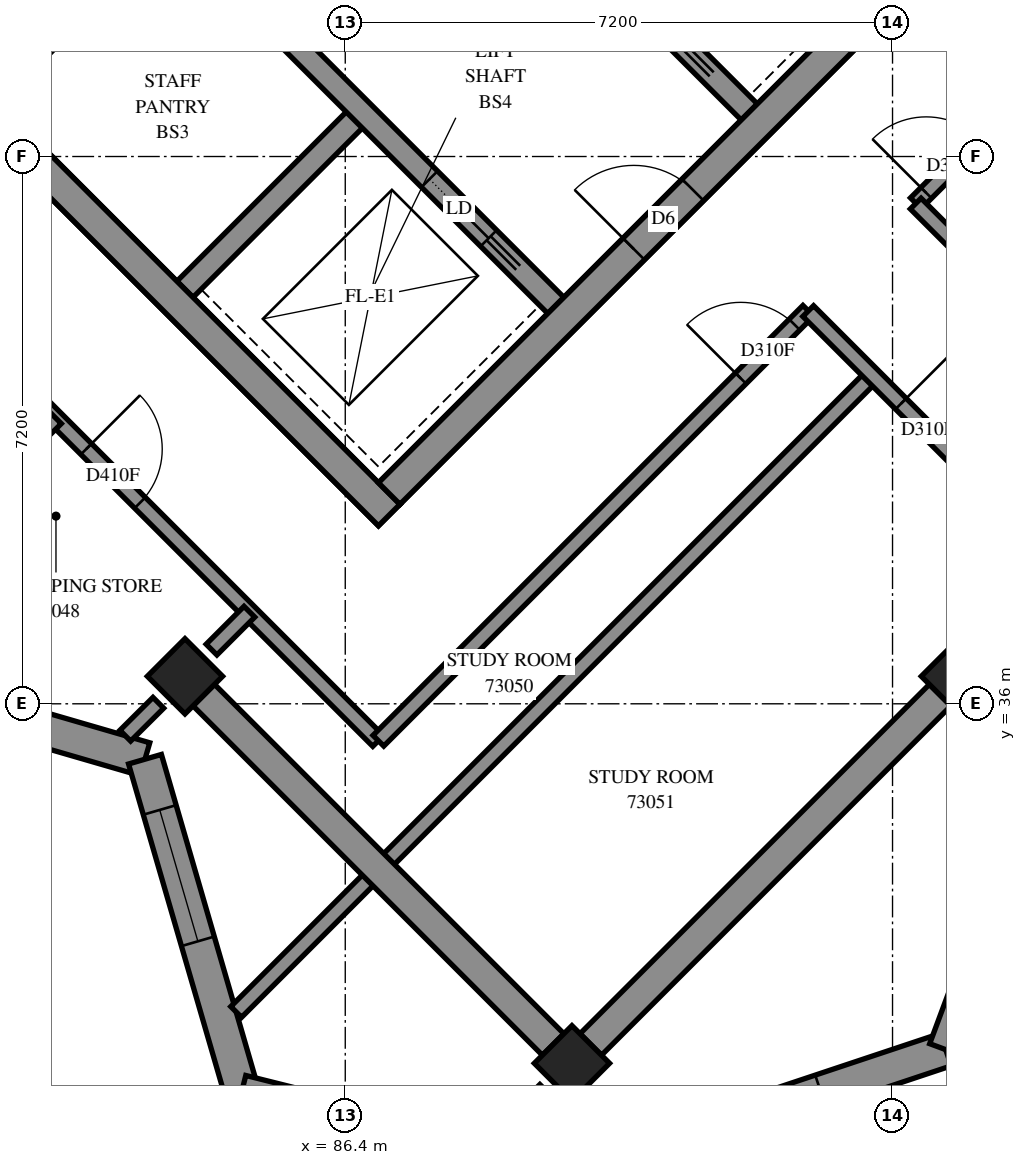
"""IFC4 building model, lengths in metres.
Left out: names, types, materials, properties, quantities, classifications, styles, units other than length and angle.
Written with IfcOpenShell. Run it as: python <this file> out.ifc"""

import sys

from ifc_helpers import new_model, si_unit, direction, frame, frame_2d, origin, origin_2d, place, context, subcontext, project, spatial, polyline, rectangle, outline, extrude, element, fill, save


model = new_model("IFC4")
c1 = context("Model", 3, precision=1e-05, world=origin(), true_north=direction((0.0, 1.0)))
c2 = subcontext(c1, "Body", "Model", "MODEL_VIEW")
j1 = project(units=[si_unit("LENGTHUNIT", "METRE"), si_unit("PLANEANGLEUNIT", "RADIAN")], contexts=[c1])
p1 = place(None, origin())
s1 = spatial("IfcSite", under=j1, at=p1, CompositionType="ELEMENT")
p2 = place(p1, origin())
s2 = spatial("IfcBuilding", under=s1, at=p2, CompositionType="ELEMENT")
p3 = place(p2, frame((0.0, 0.0, 267.6)))
s3 = spatial("IfcBuildingStorey", under=s2, at=p3, CompositionType="ELEMENT", Elevation=267.6)
for number, where, z_axis, x_axis in (
    (1, (84.291, 36.362, 0.0), (0.0, 0.0, 1.0), (0.707, -0.707, 0.0)),
    (2, (94.474, 36.362, 0.0), (0.0, 0.0, 1.0), (0.707, -0.707, 0.0)),
    (3, (89.382, 31.271, 0.0), (0.0, 0.0, 1.0), (0.707, -0.707, 0.0)),
):
    element("IfcColumn", number, at=place(p3, frame(where, z_axis=z_axis, x_axis=x_axis)), inside=s3, PredefinedType="COLUMN", context=c2, shape_type="SweptSolid", body=[
        extrude(rectangle(XDim=0.7, YDim=0.7, at=origin_2d()), origin(), (0.0, 0.0, 1.0), 3.1),
    ])
p4 = place(p3, frame((76.23, 49.231, -0.3), z_axis=(0.0, 0.0, 1.0), x_axis=(0.7071034917, -0.7071100706, 0.0)))
e4 = element("IfcWall", 4, at=p4, inside=s3, PredefinedType="SHEAR", context=c2, shape_type="SweptSolid", body=[
    extrude(rectangle(XDim=15.2, YDim=0.4, at=frame_2d((7.6, 0.0))), origin(), (0.0, 0.0, 1.0), 2.7),
])
p5 = place(p3, frame((86.978, 38.766, -0.3), z_axis=(0.0, 0.0, 1.0), x_axis=(0.7071067812, 0.7071067812, 0.0)))
e5 = element("IfcWall", 5, at=p5, inside=s3, PredefinedType="SHEAR", context=c2, shape_type="SweptSolid", body=[
    extrude(rectangle(XDim=14.4, YDim=0.4, at=frame_2d((7.2, 0.0))), origin(), (0.0, 0.0, 1.0), 2.7),
])
p6 = place(p5, frame((4.55, 0.0, 0.3)))
e6 = element("IfcOpeningElement", 6, at=p6, cuts=e5, PredefinedType="OPENING", context=c2, shape_type="SweptSolid", body=[
    extrude(rectangle(XDim=1.1, YDim=2.1, at=frame_2d((0.55, 1.05))), frame((0.0, 0.21, 0.0), z_axis=(0.0, -1.0, 0.0), x_axis=(1.0, 0.0, 0.0)), (0.0, 0.0, 1.0), 0.42),
])
p7 = place(p5, frame((11.35, 0.0, 0.3)))
e7 = element("IfcOpeningElement", 7, at=p7, cuts=e5, PredefinedType="OPENING", context=c2, shape_type="SweptSolid", body=[
    extrude(rectangle(XDim=1.1, YDim=2.1, at=frame_2d((0.55, 1.05))), frame((0.0, 0.21, 0.0), z_axis=(0.0, -1.0, 0.0), x_axis=(1.0, 0.0, 0.0)), (0.0, 0.0, 1.0), 0.42),
])
for number, where, z_axis, x_axis in (
    (8, (81.746, 43.999, 0.0), (0.0, 0.0, 1.0), (0.707, 0.707, 0.0)),
    (9, (84.291, 41.453, 0.0), (0.0, 0.0, 1.0), (0.707, 0.707, 0.0)),
):
    element("IfcWall", number, at=place(p3, frame(where, z_axis=z_axis, x_axis=x_axis)), inside=s3, PredefinedType="SOLIDWALL", context=c2, shape_type="SweptSolid", body=[
        extrude(rectangle(XDim=3.3, YDim=0.3, at=frame_2d((1.65, 0.0))), origin(), (0.0, 0.0, 1.0), 3.1),
    ])
p8 = place(p3, frame((78.988, 51.423, 0.0), z_axis=(0.0, 0.0, 1.0), x_axis=(0.7071067812, -0.7071067812, 0.0)))
e10 = element("IfcWall", 10, at=p8, inside=s3, PredefinedType="SOLIDWALL", context=c2, shape_type="SweptSolid", body=[
    extrude(rectangle(XDim=14.4, YDim=0.3, at=frame_2d((7.2, 0.0))), origin(), (0.0, 0.0, 1.0), 3.1),
])
p9 = place(p8, frame((4.95, 0.0, 0.0)))
e11 = element("IfcOpeningElement", 11, at=p9, cuts=e10, PredefinedType="OPENING", context=c2, shape_type="SweptSolid", body=[
    extrude(rectangle(XDim=0.9, YDim=2.1, at=frame_2d((0.45, 1.05))), frame((0.0, 0.16, 0.0), z_axis=(0.0, -1.0, 0.0), x_axis=(1.0, 0.0, 0.0)), (0.0, 0.0, 1.0), 0.32),
])
p10 = place(p8, frame((8.55, 0.0, 0.0)))
e12 = element("IfcOpeningElement", 12, at=p10, cuts=e10, PredefinedType="OPENING", context=c2, shape_type="SweptSolid", body=[
    extrude(rectangle(XDim=0.9, YDim=2.1, at=frame_2d((0.45, 1.05))), frame((0.0, 0.16, 0.0), z_axis=(0.0, -1.0, 0.0), x_axis=(1.0, 0.0, 0.0)), (0.0, 0.0, 1.0), 0.32),
])
p11 = place(p8, frame((12.05, 0.0, 0.0)))
e13 = element("IfcOpeningElement", 13, at=p11, cuts=e10, PredefinedType="OPENING", context=c2, shape_type="SweptSolid", body=[
    extrude(rectangle(XDim=1.1, YDim=2.1, at=frame_2d((0.55, 1.05))), frame((0.0, 0.16, 0.0), z_axis=(0.0, -1.0, 0.0), x_axis=(1.0, 0.0, 0.0)), (0.0, 0.0, 1.0), 0.32),
])
p12 = place(p3, frame((81.534, 53.969, 0.0), z_axis=(0.0, 0.0, 1.0), x_axis=(0.707103309, -0.7071102534, 0.0)))
e14 = element("IfcWall", 14, at=p12, inside=s3, PredefinedType="SOLIDWALL", context=c2, shape_type="SweptSolid", body=[
    extrude(rectangle(XDim=14.4, YDim=0.3, at=frame_2d((7.2, 0.0))), origin(), (0.0, 0.0, 1.0), 3.1),
])
p13 = place(p12, frame((8.55, 0.0, 0.0)))
e15 = element("IfcOpeningElement", 15, at=p13, cuts=e14, PredefinedType="OPENING", context=c2, shape_type="SweptSolid", body=[
    extrude(rectangle(XDim=0.9, YDim=2.1, at=frame_2d((0.45, 1.05))), frame((0.0, 0.16, 0.0), z_axis=(0.0, -1.0, 0.0), x_axis=(1.0, 0.0, 0.0)), (0.0, 0.0, 1.0), 0.32),
])
p14 = place(p12, frame((1.25, 0.0, 0.0)))
e16 = element("IfcOpeningElement", 16, at=p14, cuts=e14, PredefinedType="OPENING", context=c2, shape_type="SweptSolid", body=[
    extrude(rectangle(XDim=1.1, YDim=2.1, at=frame_2d((0.55, 1.05))), frame((0.0, 0.16, 0.0), z_axis=(0.0, -1.0, 0.0), x_axis=(1.0, 0.0, 0.0)), (0.0, 0.0, 1.0), 0.32),
])
p15 = place(p12, frame((4.85, 0.0, 0.0)))
e17 = element("IfcOpeningElement", 17, at=p15, cuts=e14, PredefinedType="OPENING", context=c2, shape_type="SweptSolid", body=[
    extrude(rectangle(XDim=1.1, YDim=2.1, at=frame_2d((0.55, 1.05))), frame((0.0, 0.16, 0.0), z_axis=(0.0, -1.0, 0.0), x_axis=(1.0, 0.0, 0.0)), (0.0, 0.0, 1.0), 0.32),
])
p16 = place(p12, frame((12.05, 0.0, 0.0)))
e18 = element("IfcOpeningElement", 18, at=p16, cuts=e14, PredefinedType="OPENING", context=c2, shape_type="SweptSolid", body=[
    extrude(rectangle(XDim=1.1, YDim=2.1, at=frame_2d((0.55, 1.05))), frame((0.0, 0.16, 0.0), z_axis=(0.0, -1.0, 0.0), x_axis=(1.0, 0.0, 0.0)), (0.0, 0.0, 1.0), 0.32),
])
p17 = place(p3, frame((89.373, 29.808, 0.0), z_axis=(0.0, 0.0, 1.0), x_axis=(0.9486871491, 0.3162162126, 0.0)))
e19 = element("IfcWall", 19, at=p17, inside=s3, PredefinedType="SOLIDWALL", context=c2, shape_type="SweptSolid", body=[
    extrude(outline(polyline([(-0.066, -0.225), (5.301, -0.225), (5.085, 0.225), (0.066, 0.225), (-0.066, -0.225)])), origin(), (0.0, 0.0, 1.0), 3.1),
])
p18 = place(p17, frame((1.658, 0.0, 0.6)))
e20 = element("IfcOpeningElement", 20, at=p18, cuts=e19, PredefinedType="OPENING", context=c2, shape_type="SweptSolid", body=[
    extrude(rectangle(XDim=1.8, YDim=1.9, at=frame_2d((0.9, 0.95))), frame((0.0, 0.235, 0.0), z_axis=(0.0, -1.0, 0.0), x_axis=(1.0, 0.0, 0.0)), (0.0, 0.0, 1.0), 0.47),
])
p19 = place(p3, frame((94.3, 31.45, 0.0), z_axis=(0.0, 0.0, 1.0), x_axis=(0.3481927166, 0.9374229739, 0.0)))
e21 = element("IfcWall", 21, at=p19, inside=s3, PredefinedType="SOLIDWALL", context=c2, shape_type="SweptSolid", body=[
    extrude(outline(polyline([(-0.108, -0.225), (5.172, -0.225), (5.379, 0.225), (0.108, 0.225), (-0.108, -0.225)])), origin(), (0.0, 0.0, 1.0), 3.1),
])
p20 = place(p19, frame((1.534, 0.0, 0.45)))
e22 = element("IfcOpeningElement", 22, at=p20, cuts=e21, PredefinedType="OPENING", context=c2, shape_type="SweptSolid", body=[
    extrude(rectangle(XDim=2.8, YDim=2.55, at=frame_2d((1.4, 1.275))), frame((0.0, 0.235, 0.0), z_axis=(0.0, -1.0, 0.0), x_axis=(1.0, 0.0, 0.0)), (0.0, 0.0, 1.0), 0.47),
])
p21 = place(p3, frame((79.386, 36.542, 0.0), z_axis=(0.0, 0.0, 1.0), x_axis=(0.9603399755, -0.278831726, 0.0)))
e23 = element("IfcWall", 23, at=p21, inside=s3, PredefinedType="SOLIDWALL", context=c2, shape_type="SweptSolid", body=[
    extrude(outline(polyline([(-0.129, -0.225), (4.436, -0.225), (4.684, 0.225), (0.129, 0.225), (-0.129, -0.225)])), origin(), (0.0, 0.0, 1.0), 2.6),
])
p22 = place(p21, frame((1.042, 0.0, 0.6)))
e24 = element("IfcOpeningElement", 24, at=p22, cuts=e23, PredefinedType="OPENING", context=c2, shape_type="SweptSolid", body=[
    extrude(rectangle(XDim=1.8, YDim=1.9, at=frame_2d((0.9, 0.95))), frame((0.0, 0.235, 0.0), z_axis=(0.0, -1.0, 0.0), x_axis=(1.0, 0.0, 0.0)), (0.0, 0.0, 1.0), 0.47),
])
p23 = place(p3, frame((83.765, 35.271, 0.0), z_axis=(0.0, 0.0, 1.0), x_axis=(0.278831726, -0.9603399755, 0.0)))
e25 = element("IfcWall", 25, at=p23, inside=s3, PredefinedType="SOLIDWALL", context=c2, shape_type="SweptSolid", body=[
    extrude(outline(polyline([(0.124, -0.225), (4.689, -0.225), (4.43, 0.225), (-0.124, 0.225), (0.124, -0.225)])), origin(), (0.0, 0.0, 1.0), 2.6),
])
p24 = place(p23, frame((0.695, 0.0, 0.6)))
e26 = element("IfcOpeningElement", 26, at=p24, cuts=e25, PredefinedType="OPENING", context=c2, shape_type="SweptSolid", body=[
    extrude(rectangle(XDim=1.8, YDim=1.9, at=frame_2d((0.9, 0.95))), frame((0.0, 0.235, 0.0), z_axis=(0.0, -1.0, 0.0), x_axis=(1.0, 0.0, 0.0)), (0.0, 0.0, 1.0), 0.47),
])
p25 = place(p3, frame((85.037, 30.892, 0.0), z_axis=(0.0, 0.0, 1.0), x_axis=(0.970134604, -0.2425672073, 0.0)))
e27 = element("IfcWall", 27, at=p25, inside=s3, PredefinedType="SOLIDWALL", context=c2, shape_type="SweptSolid", body=[
    extrude(outline(polyline([(-0.129, -0.225), (4.536, -0.225), (4.405, 0.225), (0.129, 0.225), (-0.129, -0.225)])), origin(), (0.0, 0.0, 1.0), 2.6),
])
p26 = place(p25, frame((1.455, 0.0, 0.6)))
e28 = element("IfcOpeningElement", 28, at=p26, cuts=e27, PredefinedType="OPENING", context=c2, shape_type="SweptSolid", body=[
    extrude(rectangle(XDim=1.8, YDim=1.9, at=frame_2d((0.9, 0.95))), frame((0.0, 0.235, 0.0), z_axis=(0.0, -1.0, 0.0), x_axis=(1.0, 0.0, 0.0)), (0.0, 0.0, 1.0), 0.47),
])
p27 = place(p3, frame((84.965, 31.946, 0.0), z_axis=(0.0, 0.0, 1.0), x_axis=(0.7070265824, 0.7071869709, 0.0)))
e29 = element("IfcWall", 29, at=p27, inside=s3, PredefinedType="PARTITIONING", context=c2, shape_type="SweptSolid", body=[
    extrude(rectangle(XDim=11.846, YDim=0.2, at=frame_2d((5.923, 0.0))), origin(), (0.0, 0.0, 1.0), 3.1),
])
p28 = place(p3, frame((93.907, 42.585, 0.0), z_axis=(0.0, 0.0, 1.0), x_axis=(0.7071067812, 0.7071067812, 0.0)))
e30 = element("IfcWall", 30, at=p28, inside=s3, PredefinedType="PARTITIONING", context=c2, shape_type="SweptSolid", body=[
    extrude(rectangle(XDim=9.201, YDim=0.2, at=frame_2d((4.601, 0.0))), origin(), (0.0, 0.0, 1.0), 3.1),
])
p29 = place(p28, frame((0.193, 0.0, 0.0)))
e31 = element("IfcOpeningElement", 31, at=p29, cuts=e30, PredefinedType="OPENING", context=c2, shape_type="SweptSolid", body=[
    extrude(rectangle(XDim=1.0, YDim=2.1, at=frame_2d((0.5, 1.05))), frame((0.0, 0.11, 0.0), z_axis=(0.0, -1.0, 0.0), x_axis=(1.0, 0.0, 0.0)), (0.0, 0.0, 1.0), 0.22),
])
p30 = place(p3, frame((80.747, 41.597, 0.0), z_axis=(0.0, 0.0, 1.0), x_axis=(0.7071067812, -0.7071067812, 0.0)))
e32 = element("IfcWall", 32, at=p30, inside=s3, PredefinedType="PARTITIONING", context=c2, shape_type="SweptSolid", body=[
    extrude(rectangle(XDim=8.607, YDim=0.2, at=frame_2d((4.303, 0.0))), origin(), (0.0, 0.0, 1.0), 3.1),
])
p31 = place(p30, frame((0.195, 0.0, 0.0)))
e33 = element("IfcOpeningElement", 33, at=p31, cuts=e32, PredefinedType="OPENING", context=c2, shape_type="SweptSolid", body=[
    extrude(rectangle(XDim=1.0, YDim=2.1, at=frame_2d((0.5, 1.05))), frame((0.0, 0.11, 0.0), z_axis=(0.0, -1.0, 0.0), x_axis=(1.0, 0.0, 0.0)), (0.0, 0.0, 1.0), 0.22),
])
p32 = place(p30, frame((3.175, 0.0, 0.0)))
e34 = element("IfcOpeningElement", 34, at=p32, cuts=e32, PredefinedType="OPENING", context=c2, shape_type="SweptSolid", body=[
    extrude(rectangle(XDim=1.0, YDim=2.1, at=frame_2d((0.5, 1.05))), frame((0.0, 0.11, 0.0), z_axis=(0.0, -1.0, 0.0), x_axis=(1.0, 0.0, 0.0)), (0.0, 0.0, 1.0), 0.22),
])
p33 = place(p3, frame((86.836, 35.514, 0.0), z_axis=(0.0, 0.0, 1.0), x_axis=(0.7071067812, 0.7071067812, 0.0)))
e35 = element("IfcWall", 35, at=p33, inside=s3, PredefinedType="PARTITIONING", context=c2, shape_type="SweptSolid", body=[
    extrude(rectangle(XDim=7.999, YDim=0.2, at=frame_2d((3.999, 0.0))), origin(), (0.0, 0.0, 1.0), 3.1),
])
p34 = place(p33, frame((6.742, 0.0, 0.0)))
e36 = element("IfcOpeningElement", 36, at=p34, cuts=e35, PredefinedType="OPENING", context=c2, shape_type="SweptSolid", body=[
    extrude(rectangle(XDim=1.0, YDim=2.1, at=frame_2d((0.5, 1.05))), frame((0.0, 0.11, 0.0), z_axis=(0.0, -1.0, 0.0), x_axis=(1.0, 0.0, 0.0)), (0.0, 0.0, 1.0), 0.22),
])
p35 = place(p3, frame((89.731, 31.621, 0.0), z_axis=(0.0, 0.0, 1.0), x_axis=(0.7071067812, 0.7071067812, 0.0)))
e37 = element("IfcWall", 37, at=p35, inside=s3, PredefinedType="PARTITIONING", context=c2, shape_type="SweptSolid", body=[
    extrude(rectangle(XDim=6.211, YDim=0.2, at=frame_2d((3.106, 0.0))), origin(), (0.0, 0.0, 1.0), 2.6),
])
p36 = place(p3, frame((93.905, 42.581, 0.0), z_axis=(0.0, 0.0, 1.0), x_axis=(0.7071067812, -0.7071067812, 0.0)))
e38 = element("IfcWall", 38, at=p36, inside=s3, PredefinedType="PARTITIONING", context=c2, shape_type="SweptSolid", body=[
    extrude(rectangle(XDim=4.8, YDim=0.2, at=frame_2d((2.4, 0.0))), origin(), (0.0, 0.0, 1.0), 3.1),
])
p37 = place(p36, frame((1.725, 0.0, 0.0)))
e39 = element("IfcOpeningElement", 39, at=p37, cuts=e38, PredefinedType="OPENING", context=c2, shape_type="SweptSolid", body=[
    extrude(rectangle(XDim=1.0, YDim=2.1, at=frame_2d((0.5, 1.05))), frame((0.0, 0.11, 0.0), z_axis=(0.0, -1.0, 0.0), x_axis=(1.0, 0.0, 0.0)), (0.0, 0.0, 1.0), 0.22),
])
p38 = place(p3, frame((92.491, 41.167, 0.0), z_axis=(0.0, 0.0, 1.0), x_axis=(0.7071067812, -0.7071067812, 0.0)))
e40 = element("IfcWall", 40, at=p38, inside=s3, PredefinedType="PARTITIONING", context=c2, shape_type="SweptSolid", body=[
    extrude(rectangle(XDim=4.8, YDim=0.2, at=frame_2d((2.4, 0.0))), origin(), (0.0, 0.0, 1.0), 3.1),
])
p39 = place(p38, frame((1.725, 0.0, 0.0)))
e41 = element("IfcOpeningElement", 41, at=p39, cuts=e40, PredefinedType="OPENING", context=c2, shape_type="SweptSolid", body=[
    extrude(rectangle(XDim=1.0, YDim=2.1, at=frame_2d((0.5, 1.05))), frame((0.0, 0.11, 0.0), z_axis=(0.0, -1.0, 0.0), x_axis=(1.0, 0.0, 0.0)), (0.0, 0.0, 1.0), 0.22),
])
p40 = place(p3, frame((79.57, 36.734, 0.0), z_axis=(0.0, 0.0, 1.0), x_axis=(0.7071184771, 0.7070950851, 0.0)))
e42 = element("IfcWall", 42, at=p40, inside=s3, PredefinedType="PARTITIONING", context=c2, shape_type="SweptSolid", body=[
    extrude(rectangle(XDim=4.275, YDim=0.2, at=frame_2d((2.138, 0.0))), origin(), (0.0, 0.0, 1.0), 3.1),
])
p41 = place(p3, frame((88.394, 30.284, 0.0), z_axis=(0.0, 0.0, 1.0), x_axis=(0.7070512369, 0.7071623211, 0.0)))
e43 = element("IfcWall", 43, at=p41, inside=s3, PredefinedType="PARTITIONING", context=c2, shape_type="SweptSolid", body=[
    extrude(rectangle(XDim=0.9, YDim=0.2, at=frame_2d((0.45, 0.0))), origin(), (0.0, 0.0, 1.0), 2.6),
])
p42 = place(p3, frame((84.641, 36.713, 0.0), z_axis=(0.0, 0.0, 1.0), x_axis=(0.7071067812, 0.7071067812, 0.0)))
e44 = element("IfcWall", 44, at=p42, inside=s3, PredefinedType="PARTITIONING", context=c2, shape_type="SweptSolid", body=[
    extrude(rectangle(XDim=0.704, YDim=0.2, at=frame_2d((0.352, 0.0))), origin(), (0.0, 0.0, 1.0), 3.1),
])
p43 = place(p3, frame((83.506, 35.581, 0.0), z_axis=(0.0, 0.0, 1.0), x_axis=(0.7089790393, 0.7052295526, 0.0)))
e45 = element("IfcWall", 45, at=p43, inside=s3, PredefinedType="PARTITIONING", context=c2, shape_type="SweptSolid", body=[
    extrude(rectangle(XDim=0.613, YDim=0.2, at=frame_2d((0.307, 0.0))), origin(), (0.0, 0.0, 1.0), 2.6),
])
p44 = place(p18, origin())
e46 = element("IfcWindow", 46, at=p44, inside=s3, PartitioningType="SINGLE_PANEL", PredefinedType="WINDOW", context=c2, shape_type="SweptSolid", body=[
    extrude(rectangle(XDim=1.8, YDim=1.9, at=frame_2d((0.9, 0.95))), frame((0.0, 0.205, 0.0), z_axis=(0.0, -1.0, 0.0), x_axis=(1.0, 0.0, 0.0)), (0.0, 0.0, 1.0), 0.06),
])
fill(e20, e46)
p45 = place(p24, origin())
e47 = element("IfcWindow", 47, at=p45, inside=s3, PartitioningType="SINGLE_PANEL", PredefinedType="WINDOW", context=c2, shape_type="SweptSolid", body=[
    extrude(rectangle(XDim=1.8, YDim=1.9, at=frame_2d((0.9, 0.95))), frame((0.0, 0.205, 0.0), z_axis=(0.0, -1.0, 0.0), x_axis=(1.0, 0.0, 0.0)), (0.0, 0.0, 1.0), 0.06),
])
fill(e26, e47)
p46 = place(p6, origin())
e48 = element("IfcDoor", 48, at=p46, inside=s3, OperationType="DOUBLE_DOOR_SINGLE_SWING", PredefinedType="DOOR", context=c2, shape_type="SweptSolid", body=[
    extrude(rectangle(XDim=1.1, YDim=2.1, at=frame_2d((0.55, 1.05))), frame((0.0, 0.025, 0.0), z_axis=(0.0, -1.0, 0.0), x_axis=(1.0, 0.0, 0.0)), (0.0, 0.0, 1.0), 0.05),
])
fill(e6, e48)
p47 = place(p11, origin())
e49 = element("IfcDoor", 49, at=p47, inside=s3, OperationType="SLIDING_TO_RIGHT", PredefinedType="DOOR", context=c2, shape_type="SweptSolid", body=[
    extrude(rectangle(XDim=1.1, YDim=2.1, at=frame_2d((0.55, 1.05))), frame((0.0, 0.025, 0.0), z_axis=(0.0, -1.0, 0.0), x_axis=(1.0, 0.0, 0.0)), (0.0, 0.0, 1.0), 0.05),
])
fill(e13, e49)
p48 = place(p32, origin())
e50 = element("IfcDoor", 50, at=p48, inside=s3, OperationType="SINGLE_SWING_LEFT", PredefinedType="DOOR", context=c2, shape_type="SweptSolid", body=[
    extrude(rectangle(XDim=1.0, YDim=2.1, at=frame_2d((0.5, 1.05))), frame((0.0, 0.025, 0.0), z_axis=(0.0, -1.0, 0.0), x_axis=(1.0, 0.0, 0.0)), (0.0, 0.0, 1.0), 0.05),
])
fill(e34, e50)
p49 = place(p29, origin())
e51 = element("IfcDoor", 51, at=p49, inside=s3, OperationType="SINGLE_SWING_LEFT", PredefinedType="DOOR", context=c2, shape_type="SweptSolid", body=[
    extrude(rectangle(XDim=1.0, YDim=2.1, at=frame_2d((0.5, 1.05))), frame((0.0, 0.025, 0.0), z_axis=(0.0, -1.0, 0.0), x_axis=(1.0, 0.0, 0.0)), (0.0, 0.0, 1.0), 0.05),
])
fill(e31, e51)
p50 = place(p34, origin())
e52 = element("IfcDoor", 52, at=p50, inside=s3, OperationType="SINGLE_SWING_RIGHT", PredefinedType="DOOR", context=c2, shape_type="SweptSolid", body=[
    extrude(rectangle(XDim=1.0, YDim=2.1, at=frame_2d((0.5, 1.05))), frame((0.0, 0.025, 0.0), z_axis=(0.0, -1.0, 0.0), x_axis=(1.0, 0.0, 0.0)), (0.0, 0.0, 1.0), 0.05),
])
fill(e36, e52)
p51 = place(p39, origin())
e53 = element("IfcDoor", 53, at=p51, inside=s3, OperationType="SINGLE_SWING_LEFT", PredefinedType="DOOR", context=c2, shape_type="SweptSolid", body=[
    extrude(rectangle(XDim=1.0, YDim=2.1, at=frame_2d((0.5, 1.05))), frame((0.0, 0.025, 0.0), z_axis=(0.0, -1.0, 0.0), x_axis=(1.0, 0.0, 0.0)), (0.0, 0.0, 1.0), 0.05),
])
fill(e41, e53)
save(model, sys.argv[1])
